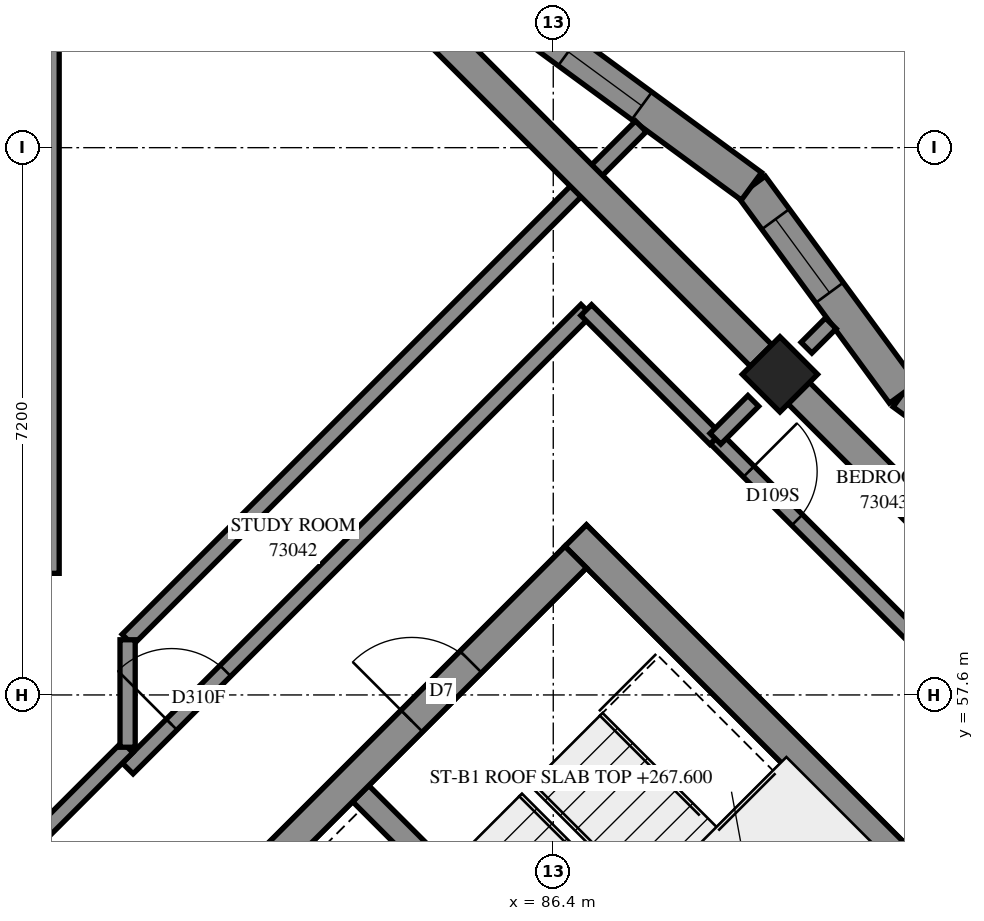
"""IFC4 building model, lengths in metres.
Left out: names, types, materials, properties, quantities, classifications, styles, units other than length and angle.
Written with IfcOpenShell. Run it as: python <this file> out.ifc"""

import sys

from ifc_helpers import new_model, si_unit, direction, frame, frame_2d, origin, origin_2d, place, context, subcontext, project, spatial, polyline, rectangle, outline, extrude, element, fill, save


model = new_model("IFC4")
c1 = context("Model", 3, precision=1e-05, world=origin(), true_north=direction((0.0, 1.0)))
c2 = subcontext(c1, "Body", "Model", "MODEL_VIEW")
j1 = project(units=[si_unit("LENGTHUNIT", "METRE"), si_unit("PLANEANGLEUNIT", "RADIAN")], contexts=[c1])
p1 = place(None, origin())
s1 = spatial("IfcSite", under=j1, at=p1, CompositionType="ELEMENT")
p2 = place(p1, origin())
s2 = spatial("IfcBuilding", under=s1, at=p2, CompositionType="ELEMENT")
p3 = place(p2, frame((0.0, 0.0, 267.6)))
s3 = spatial("IfcBuildingStorey", under=s2, at=p3, CompositionType="ELEMENT", Elevation=267.6)
p4 = place(p3, frame((89.382, 61.818, 0.0), z_axis=(0.0, 0.0, 1.0), x_axis=(0.7071067812, -0.7071067812, 0.0)))
e1 = element("IfcColumn", 1, at=p4, inside=s3, PredefinedType="COLUMN", context=c2, shape_type="SweptSolid", body=[
    extrude(rectangle(XDim=0.7, YDim=0.7, at=origin_2d()), origin(), (0.0, 0.0, 1.0), 3.1),
])
p5 = place(p3, frame((86.695, 59.696, -0.3), z_axis=(0.0, 0.0, 1.0), x_axis=(0.7071100706, -0.7071034917, 0.0)))
e2 = element("IfcWall", 2, at=p5, inside=s3, PredefinedType="SHEAR", context=c2, shape_type="SweptSolid", body=[
    extrude(rectangle(XDim=15.2, YDim=0.4, at=frame_2d((7.6, 0.0))), origin(), (0.0, 0.0, 1.0), 2.7),
])
p6 = place(p5, frame((10.4, 0.0, 0.3)))
e3 = element("IfcOpeningElement", 3, at=p6, cuts=e2, PredefinedType="OPENING", context=c2, shape_type="SweptSolid", body=[
    extrude(rectangle(XDim=0.8, YDim=2.1, at=frame_2d((0.4, 1.05))), frame((0.0, 0.21, 0.0), z_axis=(0.0, -1.0, 0.0), x_axis=(1.0, 0.0, 0.0)), (0.0, 0.0, 1.0), 0.42),
])
p7 = place(p3, frame((76.513, 49.231, -0.3), z_axis=(0.0, 0.0, 1.0), x_axis=(0.7071067812, 0.7071067812, 0.0)))
e4 = element("IfcWall", 4, at=p7, inside=s3, PredefinedType="SHEAR", context=c2, shape_type="SweptSolid", body=[
    extrude(rectangle(XDim=14.4, YDim=0.4, at=frame_2d((7.2, 0.0))), origin(), (0.0, 0.0, 1.0), 2.7),
])
p8 = place(p7, frame((5.65, 0.0, 0.3)))
e5 = element("IfcOpeningElement", 5, at=p8, cuts=e4, PredefinedType="OPENING", context=c2, shape_type="SweptSolid", body=[
    extrude(rectangle(XDim=1.1, YDim=2.1, at=frame_2d((0.55, 1.05))), frame((0.0, 0.21, 0.0), z_axis=(0.0, -1.0, 0.0), x_axis=(1.0, 0.0, 0.0)), (0.0, 0.0, 1.0), 0.42),
])
p9 = place(p7, frame((11.35, 0.0, 0.3)))
e6 = element("IfcOpeningElement", 6, at=p9, cuts=e4, PredefinedType="OPENING", context=c2, shape_type="SweptSolid", body=[
    extrude(rectangle(XDim=1.1, YDim=2.1, at=frame_2d((0.55, 1.05))), frame((0.0, 0.21, 0.0), z_axis=(0.0, -1.0, 0.0), x_axis=(1.0, 0.0, 0.0)), (0.0, 0.0, 1.0), 0.42),
])
p10 = place(p7, frame((0.25, 0.0, 0.0)))
e7 = element("IfcOpeningElement", 7, at=p10, cuts=e4, PredefinedType="OPENING", context=c2, shape_type="SweptSolid", body=[
    extrude(rectangle(XDim=0.9, YDim=2.1, at=frame_2d((0.45, 1.05))), frame((0.0, 0.21, 0.0), z_axis=(0.0, -1.0, 0.0), x_axis=(1.0, 0.0, 0.0)), (0.0, 0.0, 1.0), 0.42),
])
p11 = place(p3, frame((83.867, 56.302, 0.0), z_axis=(0.0, 0.0, 1.0), x_axis=(0.7071137256, -0.7070998367, 0.0)))
e8 = element("IfcWall", 8, at=p11, inside=s3, PredefinedType="SOLIDWALL", context=c2, shape_type="SweptSolid", body=[
    extrude(rectangle(XDim=7.2, YDim=0.3, at=frame_2d((3.6, 0.0))), origin(), (0.0, 0.0, 1.0), 3.1),
])
p12 = place(p3, frame((93.725, 59.574, 0.0), z_axis=(0.0, 0.0, 1.0), x_axis=(-0.806200528, 0.5916423825, 0.0)))
e9 = element("IfcWall", 9, at=p12, inside=s3, PredefinedType="SOLIDWALL", context=c2, shape_type="SweptSolid", body=[
    extrude(outline(polyline([(-0.035, -0.225), (3.34, -0.225), (3.409, 0.225), (0.035, 0.225), (-0.035, -0.225)])), origin(), (0.0, 0.0, 1.0), 3.1),
])
p13 = place(p12, frame((1.522, 0.0, 0.45)))
e10 = element("IfcOpeningElement", 10, at=p13, cuts=e9, PredefinedType="OPENING", context=c2, shape_type="SweptSolid", body=[
    extrude(rectangle(XDim=1.2, YDim=2.55, at=frame_2d((0.6, 1.275))), frame((0.0, 0.235, 0.0), z_axis=(0.0, -1.0, 0.0), x_axis=(1.0, 0.0, 0.0)), (0.0, 0.0, 1.0), 0.47),
])
p14 = place(p3, frame((91.004, 61.571, 0.0), z_axis=(0.0, 0.0, 1.0), x_axis=(-0.5916423825, 0.806200528, 0.0)))
e11 = element("IfcWall", 11, at=p14, inside=s3, PredefinedType="SOLIDWALL", context=c2, shape_type="SweptSolid", body=[
    extrude(outline(polyline([(0.035, -0.225), (3.409, -0.225), (3.34, 0.225), (-0.035, 0.225), (0.035, -0.225)])), origin(), (0.0, 0.0, 1.0), 3.1),
])
p15 = place(p14, frame((1.639, 0.0, 0.45)))
e12 = element("IfcOpeningElement", 12, at=p15, cuts=e11, PredefinedType="OPENING", context=c2, shape_type="SweptSolid", body=[
    extrude(rectangle(XDim=1.2, YDim=2.55, at=frame_2d((0.6, 1.275))), frame((0.0, 0.235, 0.0), z_axis=(0.0, -1.0, 0.0), x_axis=(1.0, 0.0, 0.0)), (0.0, 0.0, 1.0), 0.47),
])
p16 = place(p3, frame((89.007, 64.292, 0.0), z_axis=(0.0, 0.0, 1.0), x_axis=(-0.8061901555, 0.5916565162, 0.0)))
e13 = element("IfcWall", 13, at=p16, inside=s3, PredefinedType="SOLIDWALL", context=c2, shape_type="SweptSolid", body=[
    extrude(outline(polyline([(-0.035, -0.225), (3.34, -0.225), (3.409, 0.225), (0.035, 0.225), (-0.035, -0.225)])), origin(), (0.0, 0.0, 1.0), 3.1),
])
p17 = place(p16, frame((1.789, 0.0, 0.45)))
e14 = element("IfcOpeningElement", 14, at=p17, cuts=e13, PredefinedType="OPENING", context=c2, shape_type="SweptSolid", body=[
    extrude(rectangle(XDim=1.2, YDim=2.55, at=frame_2d((0.6, 1.275))), frame((0.0, 0.235, 0.0), z_axis=(0.0, -1.0, 0.0), x_axis=(1.0, 0.0, 0.0)), (0.0, 0.0, 1.0), 0.47),
])
p18 = place(p3, frame((79.8, 59.2, 0.0), z_axis=(0.0, 0.0, 1.0), x_axis=(0.0, 1.0, 0.0)))
e15 = element("IfcWall", 15, at=p18, inside=s3, PredefinedType="PARTITIONING", context=c2, shape_type="SweptSolid", body=[
    extrude(rectangle(XDim=13.8, YDim=0.2, at=frame_2d((6.9, 0.0))), origin(), (0.0, 0.0, 1.0), 3.1),
])
p19 = place(p3, frame((80.799, 58.327, 0.0), z_axis=(0.0, 0.0, 1.0), x_axis=(0.7071120163, 0.707101546, 0.0)))
e16 = element("IfcWall", 16, at=p19, inside=s3, PredefinedType="PARTITIONING", context=c2, shape_type="SweptSolid", body=[
    extrude(rectangle(XDim=9.551, YDim=0.2, at=frame_2d((4.775, 0.0))), origin(), (0.0, 0.0, 1.0), 3.1),
])
p20 = place(p3, frame((80.802, 56.633, 0.0), z_axis=(0.0, 0.0, 1.0), x_axis=(0.7071067812, 0.7071067812, 0.0)))
e17 = element("IfcWall", 17, at=p20, inside=s3, PredefinedType="PARTITIONING", context=c2, shape_type="SweptSolid", body=[
    extrude(rectangle(XDim=8.533, YDim=0.2, at=frame_2d((4.267, 0.0))), origin(), (0.0, 0.0, 1.0), 3.1),
])
p21 = place(p20, frame((0.817, 0.0, 0.0)))
e18 = element("IfcOpeningElement", 18, at=p21, cuts=e17, PredefinedType="OPENING", context=c2, shape_type="SweptSolid", body=[
    extrude(rectangle(XDim=1.0, YDim=2.1, at=frame_2d((0.5, 1.05))), frame((0.0, 0.11, 0.0), z_axis=(0.0, -1.0, 0.0), x_axis=(1.0, 0.0, 0.0)), (0.0, 0.0, 1.0), 0.22),
])
p22 = place(p3, frame((88.537, 60.973, 0.0), z_axis=(0.0, 0.0, 1.0), x_axis=(0.7071067812, -0.7071067812, 0.0)))
e19 = element("IfcWall", 19, at=p22, inside=s3, PredefinedType="PARTITIONING", context=c2, shape_type="SweptSolid", body=[
    extrude(rectangle(XDim=6.401, YDim=0.2, at=frame_2d((3.2, 0.0))), origin(), (0.0, 0.0, 1.0), 3.1),
])
p23 = place(p22, frame((0.615, 0.0, 0.0)))
e20 = element("IfcOpeningElement", 20, at=p23, cuts=e19, PredefinedType="OPENING", context=c2, shape_type="SweptSolid", body=[
    extrude(rectangle(XDim=0.9, YDim=2.1, at=frame_2d((0.45, 1.05))), frame((0.0, 0.11, 0.0), z_axis=(0.0, -1.0, 0.0), x_axis=(1.0, 0.0, 0.0)), (0.0, 0.0, 1.0), 0.22),
])
p24 = place(p3, frame((86.833, 62.663, 0.0), z_axis=(0.0, 0.0, 1.0), x_axis=(0.7075233388, -0.706689978, 0.0)))
e21 = element("IfcWall", 21, at=p24, inside=s3, PredefinedType="PARTITIONING", context=c2, shape_type="SweptSolid", body=[
    extrude(rectangle(XDim=2.4, YDim=0.2, at=frame_2d((1.2, 0.0))), origin(), (0.0, 0.0, 1.0), 3.1),
])
p25 = place(p3, frame((79.599, 55.713, 0.0), z_axis=(0.0, 0.0, 1.0), x_axis=(0.7071067812, 0.7071067812, 0.0)))
e22 = element("IfcWall", 22, at=p25, inside=s3, PredefinedType="PARTITIONING", context=c2, shape_type="SweptSolid", body=[
    extrude(rectangle(XDim=1.697, YDim=0.2, at=frame_2d((0.849, 0.0))), origin(), (0.0, 0.0, 1.0), 3.1),
])
p26 = place(p3, frame((80.8, 56.912, 0.0), z_axis=(0.0, 0.0, 1.0), x_axis=(0.0, 1.0, 0.0)))
e23 = element("IfcWall", 23, at=p26, inside=s3, PredefinedType="PARTITIONING", context=c2, shape_type="SweptSolid", body=[
    extrude(rectangle(XDim=1.414, YDim=0.2, at=frame_2d((0.707, 0.0))), origin(), (0.0, 0.0, 1.0), 3.1),
])
p27 = place(p3, frame((88.534, 60.971, 0.0), z_axis=(0.0, 0.0, 1.0), x_axis=(0.7071067812, 0.7071067812, 0.0)))
e24 = element("IfcWall", 24, at=p27, inside=s3, PredefinedType="PARTITIONING", context=c2, shape_type="SweptSolid", body=[
    extrude(rectangle(XDim=0.704, YDim=0.2, at=frame_2d((0.352, 0.0))), origin(), (0.0, 0.0, 1.0), 3.1),
])
p28 = place(p3, frame((89.731, 62.169, 0.0), z_axis=(0.0, 0.0, 1.0), x_axis=(0.7072172062, 0.7069963389, 0.0)))
e25 = element("IfcWall", 25, at=p28, inside=s3, PredefinedType="PARTITIONING", context=c2, shape_type="SweptSolid", body=[
    extrude(rectangle(XDim=0.453, YDim=0.2, at=frame_2d((0.226, 0.0))), origin(), (0.0, 0.0, 1.0), 3.1),
])
p29 = place(p15, origin())
e26 = element("IfcWindow", 26, at=p29, inside=s3, PartitioningType="SINGLE_PANEL", PredefinedType="WINDOW", context=c2, shape_type="SweptSolid", body=[
    extrude(rectangle(XDim=1.2, YDim=2.55, at=frame_2d((0.6, 1.275))), frame((0.0, 0.205, 0.0), z_axis=(0.0, -1.0, 0.0), x_axis=(1.0, 0.0, 0.0)), (0.0, 0.0, 1.0), 0.06),
])
fill(e12, e26)
p30 = place(p17, origin())
e27 = element("IfcWindow", 27, at=p30, inside=s3, PartitioningType="SINGLE_PANEL", PredefinedType="WINDOW", context=c2, shape_type="SweptSolid", body=[
    extrude(rectangle(XDim=1.2, YDim=2.55, at=frame_2d((0.6, 1.275))), frame((0.0, 0.205, 0.0), z_axis=(0.0, -1.0, 0.0), x_axis=(1.0, 0.0, 0.0)), (0.0, 0.0, 1.0), 0.06),
])
fill(e14, e27)
p31 = place(p9, origin())
e28 = element("IfcDoor", 28, at=p31, inside=s3, OperationType="SINGLE_SWING_LEFT", PredefinedType="DOOR", context=c2, shape_type="SweptSolid", body=[
    extrude(rectangle(XDim=1.1, YDim=2.1, at=frame_2d((0.55, 1.05))), frame((0.0, 0.025, 0.0), z_axis=(0.0, -1.0, 0.0), x_axis=(1.0, 0.0, 0.0)), (0.0, 0.0, 1.0), 0.05),
])
fill(e6, e28)
p32 = place(p21, origin())
e29 = element("IfcDoor", 29, at=p32, inside=s3, OperationType="SINGLE_SWING_RIGHT", PredefinedType="DOOR", context=c2, shape_type="SweptSolid", body=[
    extrude(rectangle(XDim=1.0, YDim=2.1, at=frame_2d((0.5, 1.05))), frame((0.0, 0.025, 0.0), z_axis=(0.0, -1.0, 0.0), x_axis=(1.0, 0.0, 0.0)), (0.0, 0.0, 1.0), 0.05),
])
fill(e18, e29)
p33 = place(p23, origin())
e30 = element("IfcDoor", 30, at=p33, inside=s3, OperationType="SINGLE_SWING_LEFT", PredefinedType="DOOR", context=c2, shape_type="SweptSolid", body=[
    extrude(rectangle(XDim=0.9, YDim=2.1, at=frame_2d((0.45, 1.05))), frame((0.0, 0.025, 0.0), z_axis=(0.0, -1.0, 0.0), x_axis=(1.0, 0.0, 0.0)), (0.0, 0.0, 1.0), 0.05),
])
fill(e20, e30)
save(model, sys.argv[1])
